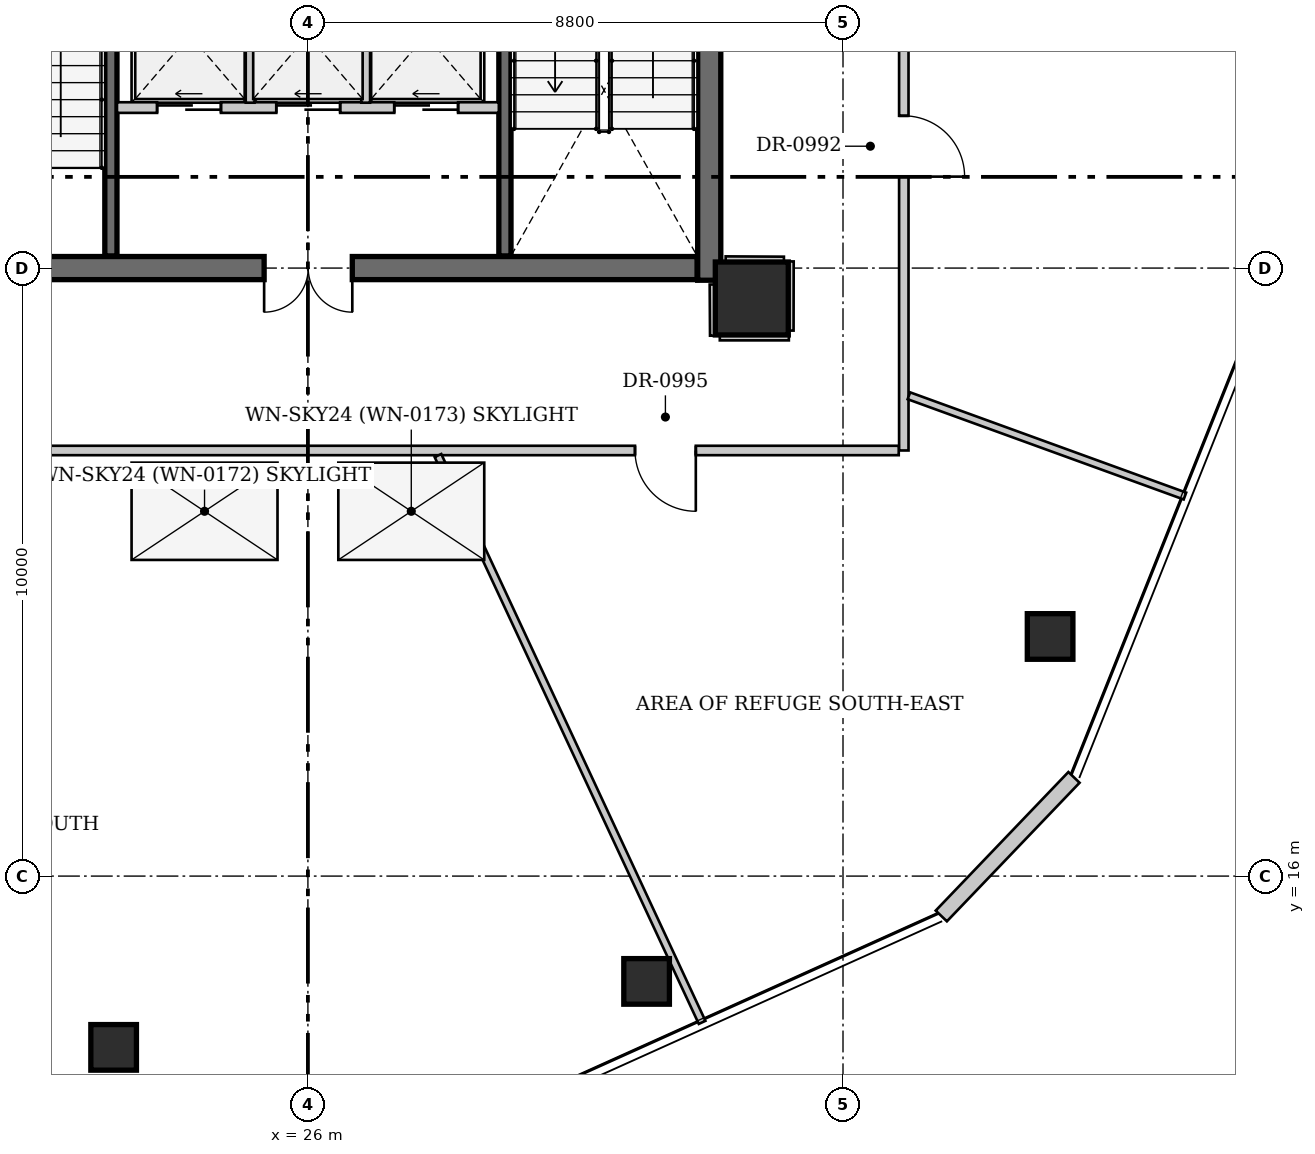
"""IFC4 building model, lengths in metres.
Left out: names, types, materials, properties, quantities, classifications, styles, units other than length and angle.
Written with IfcOpenShell. Run it as: python <this file> out.ifc"""

import sys

from ifc_helpers import new_model, si_unit, direction, frame, frame_2d, origin, origin_2d, place, context, subcontext, project, spatial, rectangle, hollow_rectangle, extrude, source, transform, mapped, element, fill, save


model = new_model("IFC4")
c1 = context("Model", 3, precision=1e-05, world=origin(), true_north=direction((0.0, 1.0)))
c2 = subcontext(c1, "Body", "Model", "MODEL_VIEW")
j1 = project(units=[si_unit("LENGTHUNIT", "METRE"), si_unit("PLANEANGLEUNIT", "RADIAN")], contexts=[c1])
p1 = place(None, origin())
s1 = spatial("IfcSite", under=j1, at=p1, CompositionType="ELEMENT")
p2 = place(p1, origin())
s2 = spatial("IfcBuilding", under=s1, at=p2, CompositionType="ELEMENT")
p3 = place(p2, frame((0.0, 0.0, 162.4)))
s3 = spatial("IfcBuildingStorey", under=s2, at=p3, CompositionType="ELEMENT", Elevation=162.4)
for number, where, z_axis, x_axis in (
    (1, (38.206, 19.941, 0.0), (0.0, 0.0, 1.0), (1.0, 0.0, 0.0)),
    (2, (31.57, 14.268, 0.0), (0.0, 0.0, 1.0), (1.0, 0.0, 0.0)),
    (3, (22.805, 13.183, 0.0), (0.0, 0.0, 1.0), (1.0, 0.0, 0.0)),
):
    element("IfcColumn", number, at=place(p3, frame(where, z_axis=z_axis, x_axis=x_axis)), inside=s3, PredefinedType="COLUMN", context=c2, shape_type="SweptSolid", body=[
        extrude(hollow_rectangle(XDim=0.75, YDim=0.75, WallThickness=0.04, at=origin_2d()), origin(), (0.0, 0.0, 1.0), 4.15),
    ])
p4 = place(p3, frame((33.3, 25.5, 0.0), z_axis=(0.0, 0.0, 1.0), x_axis=(1.0, 0.0, 0.0)))
e4 = element("IfcColumn", 4, at=p4, inside=s3, PredefinedType="COLUMN", context=c2, shape_type="SweptSolid", body=[
    extrude(rectangle(XDim=1.2, YDim=1.2, at=origin_2d()), origin(), (0.0, 0.0, 1.0), 4.15),
])
p5 = place(p3, frame((38.599, 17.623, 0.0), z_axis=(0.0, 0.0, 1.0), x_axis=(-0.691540575934, -0.722337616241, 0.0)))
e5 = element("IfcWall", 5, at=p5, inside=s3, PredefinedType="SOLIDWALL", context=c2, shape_type="SweptSolid", body=[
    extrude(rectangle(XDim=3.155, YDim=0.255, at=frame_2d((1.578, 0.0))), origin(), (0.0, 0.0, 1.0), 4.15),
])
p6 = place(p3, frame((32.6, 36.6, 0.0), z_axis=(0.0, 0.0, 1.0), x_axis=(0.0, -1.0, 0.0)))
e6 = element("IfcWall", 6, at=p6, inside=s3, PredefinedType="SHEAR", context=c2, shape_type="SweptSolid", body=[
    extrude(rectangle(XDim=10.8, YDim=0.38, at=frame_2d((5.4, 0.0))), origin(), (0.0, 0.0, 1.0), 4.6),
])
p7 = place(p6, frame((3.7, 0.0, 0.0)))
e7 = element("IfcOpeningElement", 7, at=p7, cuts=e6, PredefinedType="OPENING", context=c2, shape_type="SweptSolid", body=[
    extrude(rectangle(XDim=1.05, YDim=2.15, at=frame_2d((0.525, 1.075))), frame((0.0, 0.2, 0.0), z_axis=(0.0, -1.0, 0.0), x_axis=(1.0, 0.0, 0.0)), (0.0, 0.0, 1.0), 0.4),
])
p8 = place(p6, frame((2.05, 0.0, 0.0)))
e8 = element("IfcOpeningElement", 8, at=p8, cuts=e6, PredefinedType="OPENING", context=c2, shape_type="SweptSolid", body=[
    extrude(rectangle(XDim=0.9, YDim=2.1, at=frame_2d((0.45, 1.05))), frame((0.0, 0.2, 0.0), z_axis=(0.0, -1.0, 0.0), x_axis=(1.0, 0.0, 0.0)), (0.0, 0.0, 1.0), 0.4),
])
p9 = place(p3, frame((32.4, 26.0, 0.0), z_axis=(0.0, 0.0, 1.0), x_axis=(-1.0, 0.0, 0.0)))
e9 = element("IfcWall", 9, at=p9, inside=s3, PredefinedType="SHEAR", context=c2, shape_type="SweptSolid", body=[
    extrude(rectangle(XDim=12.8, YDim=0.38, at=frame_2d((6.4, 0.0))), origin(), (0.0, 0.0, 1.0), 4.6),
])
p10 = place(p9, frame((10.75, 0.0, 0.0)))
e10 = element("IfcOpeningElement", 10, at=p10, cuts=e9, PredefinedType="OPENING", context=c2, shape_type="SweptSolid", body=[
    extrude(rectangle(XDim=1.05, YDim=2.15, at=frame_2d((0.525, 1.075))), frame((0.0, 0.2, 0.0), z_axis=(0.0, -1.0, 0.0), x_axis=(1.0, 0.0, 0.0)), (0.0, 0.0, 1.0), 0.4),
])
p11 = place(p9, frame((5.67, 0.0, 0.0)))
e11 = element("IfcOpeningElement", 11, at=p11, cuts=e9, PredefinedType="OPENING", context=c2, shape_type="SweptSolid", body=[
    extrude(rectangle(XDim=1.45, YDim=2.2, at=frame_2d((0.725, 1.1))), frame((0.0, 0.2, 0.0), z_axis=(0.0, -1.0, 0.0), x_axis=(1.0, 0.0, 0.0)), (0.0, 0.0, 1.0), 0.4),
])
p12 = place(p3, frame((22.76, 26.2, 0.0), z_axis=(0.0, 0.0, 1.0), x_axis=(0.0, 1.0, 0.0)))
e12 = element("IfcWall", 12, at=p12, inside=s3, PredefinedType="SHEAR", context=c2, shape_type="SweptSolid", body=[
    extrude(rectangle(XDim=10.0, YDim=0.2, at=frame_2d((5.0, 0.0))), origin(), (0.0, 0.0, 1.0), 4.6),
])
p13 = place(p3, frame((29.24, 26.2, 0.0), z_axis=(0.0, 0.0, 1.0), x_axis=(0.0, 1.0, 0.0)))
e13 = element("IfcWall", 13, at=p13, inside=s3, PredefinedType="SHEAR", context=c2, shape_type="SweptSolid", body=[
    extrude(rectangle(XDim=10.0, YDim=0.2, at=frame_2d((5.0, 0.0))), origin(), (0.0, 0.0, 1.0), 4.6),
])
p14 = place(p13, frame((5.65, 0.0, 0.0)))
e14 = element("IfcOpeningElement", 14, at=p14, cuts=e13, PredefinedType="OPENING", context=c2, shape_type="SweptSolid", body=[
    extrude(rectangle(XDim=1.05, YDim=2.15, at=frame_2d((0.525, 1.075))), frame((0.0, 0.11, 0.0), z_axis=(0.0, -1.0, 0.0), x_axis=(1.0, 0.0, 0.0)), (0.0, 0.0, 1.0), 0.22),
])
p15 = place(p3, frame((22.86, 28.64, 0.0), z_axis=(0.0, 0.0, 1.0), x_axis=(1.0, 0.0, 0.0)))
e15 = element("IfcWall", 15, at=p15, inside=s3, PredefinedType="SOLIDWALL", context=c2, shape_type="SweptSolid", body=[
    extrude(rectangle(XDim=6.28, YDim=0.175, at=frame_2d((3.14, 0.0))), origin(), (0.0, 0.0, 1.0), 4.15),
])
p16 = place(p15, frame((0.66, 0.0, 0.0)))
e16 = element("IfcOpeningElement", 16, at=p16, cuts=e15, PredefinedType="OPENING", context=c2, shape_type="SweptSolid", body=[
    extrude(rectangle(XDim=1.05, YDim=2.15, at=frame_2d((0.525, 1.075))), frame((0.0, 0.098, 0.0), z_axis=(0.0, -1.0, 0.0), x_axis=(1.0, 0.0, 0.0)), (0.0, 0.0, 1.0), 0.195),
])
p17 = place(p15, frame((2.62, 0.0, 0.0)))
e17 = element("IfcOpeningElement", 17, at=p17, cuts=e15, PredefinedType="OPENING", context=c2, shape_type="SweptSolid", body=[
    extrude(rectangle(XDim=1.05, YDim=2.15, at=frame_2d((0.525, 1.075))), frame((0.0, 0.098, 0.0), z_axis=(0.0, -1.0, 0.0), x_axis=(1.0, 0.0, 0.0)), (0.0, 0.0, 1.0), 0.195),
])
p18 = place(p15, frame((4.56, 0.0, 0.0)))
e18 = element("IfcOpeningElement", 18, at=p18, cuts=e15, PredefinedType="OPENING", context=c2, shape_type="SweptSolid", body=[
    extrude(rectangle(XDim=1.05, YDim=2.15, at=frame_2d((0.525, 1.075))), frame((0.0, 0.098, 0.0), z_axis=(0.0, -1.0, 0.0), x_axis=(1.0, 0.0, 0.0)), (0.0, 0.0, 1.0), 0.195),
])
for number, where, z_axis, x_axis in (
    (19, (25.05, 28.72, 0.0), (0.0, 0.0, 1.0), (0.0, 1.0, 0.0)),
    (20, (26.95, 28.72, 0.0), (0.0, 0.0, 1.0), (0.0, 1.0, 0.0)),
):
    element("IfcWall", number, at=place(p3, frame(where, z_axis=z_axis, x_axis=x_axis)), inside=s3, PredefinedType="SOLIDWALL", context=c2, shape_type="SweptSolid", body=[
        extrude(rectangle(XDim=2.207, YDim=0.145, at=frame_2d((1.103, 0.0))), origin(), (0.0, 0.0, 1.0), 4.15),
    ])
p19 = place(p3, frame((35.8, 41.267, 0.0), z_axis=(0.0, 0.0, 1.0), x_axis=(0.0, -1.0, 0.0)))
e21 = element("IfcWall", 21, at=p19, inside=s3, PredefinedType="PARTITIONING", context=c2, shape_type="SweptSolid", body=[
    extrude(rectangle(XDim=18.267, YDim=0.155, at=frame_2d((9.133, 0.0))), origin(), (0.0, 0.0, 1.0), 4.15),
])
p20 = place(p19, frame((12.762, 0.0, 0.0)))
e22 = element("IfcOpeningElement", 22, at=p20, cuts=e21, PredefinedType="OPENING", context=c2, shape_type="SweptSolid", body=[
    extrude(rectangle(XDim=1.0, YDim=2.15, at=frame_2d((0.5, 1.075))), frame((0.0, 0.087, 0.0), z_axis=(0.0, -1.0, 0.0), x_axis=(1.0, 0.0, 0.0)), (0.0, 0.0, 1.0), 0.175),
])
p21 = place(p19, frame((4.126, 0.0, 0.0)))
e23 = element("IfcOpeningElement", 23, at=p21, cuts=e21, PredefinedType="OPENING", context=c2, shape_type="SweptSolid", body=[
    extrude(rectangle(XDim=1.0, YDim=2.15, at=frame_2d((0.5, 1.075))), frame((0.0, 0.087, 0.0), z_axis=(0.0, -1.0, 0.0), x_axis=(1.0, 0.0, 0.0)), (0.0, 0.0, 1.0), 0.175),
])
p22 = place(p3, frame((35.717, 23.0, 0.0), z_axis=(0.0, 0.0, 1.0), x_axis=(-1.0, 0.0, 0.0)))
e24 = element("IfcWall", 24, at=p22, inside=s3, PredefinedType="PARTITIONING", context=c2, shape_type="SweptSolid", body=[
    extrude(rectangle(XDim=20.517, YDim=0.155, at=frame_2d((10.258, 0.0))), origin(), (0.0, 0.0, 1.0), 4.15),
])
p23 = place(p22, frame((16.507, 0.0, 0.0)))
e25 = element("IfcOpeningElement", 25, at=p23, cuts=e24, PredefinedType="OPENING", context=c2, shape_type="SweptSolid", body=[
    extrude(rectangle(XDim=1.0, YDim=2.15, at=frame_2d((0.5, 1.075))), frame((0.0, 0.087, 0.0), z_axis=(0.0, -1.0, 0.0), x_axis=(1.0, 0.0, 0.0)), (0.0, 0.0, 1.0), 0.175),
])
p24 = place(p22, frame((3.337, 0.0, 0.0)))
e26 = element("IfcOpeningElement", 26, at=p24, cuts=e24, PredefinedType="OPENING", context=c2, shape_type="SweptSolid", body=[
    extrude(rectangle(XDim=1.0, YDim=2.15, at=frame_2d((0.5, 1.075))), frame((0.0, 0.087, 0.0), z_axis=(0.0, -1.0, 0.0), x_axis=(1.0, 0.0, 0.0)), (0.0, 0.0, 1.0), 0.175),
])
p25 = place(p3, frame((32.685, 25.73, 0.0), z_axis=(0.0, 0.0, 1.0), x_axis=(0.006382231486, -0.999979633353, 0.0)))
e27 = element("IfcWall", 27, at=p25, inside=s3, PredefinedType="PARTITIONING", context=c2, shape_type="SweptSolid", body=[
    extrude(rectangle(XDim=0.842, YDim=0.155, at=frame_2d((0.421, 0.0))), origin(), (0.0, 0.0, 1.0), 2.725),
])
p26 = place(p3, frame((32.774, 24.888, 0.0), z_axis=(0.0, 0.0, 1.0), x_axis=(1.0, 0.0, 0.0)))
e28 = element("IfcWall", 28, at=p26, inside=s3, PredefinedType="PARTITIONING", context=c2, shape_type="SweptSolid", body=[
    extrude(rectangle(XDim=1.135, YDim=0.155, at=frame_2d((0.568, 0.0))), origin(), (0.0, 0.0, 1.0), 2.725),
])
p27 = place(p3, frame((33.91, 24.972, 0.0), z_axis=(0.0, 0.0, 1.0), x_axis=(0.001716735668, 0.999998526408, 0.0)))
e29 = element("IfcWall", 29, at=p27, inside=s3, PredefinedType="PARTITIONING", context=c2, shape_type="SweptSolid", body=[
    extrude(rectangle(XDim=1.138, YDim=0.155, at=frame_2d((0.569, 0.0))), origin(), (0.0, 0.0, 1.0), 2.725),
])
p28 = place(p3, frame((33.828, 26.11, 0.0), z_axis=(0.0, 0.0, 1.0), x_axis=(-0.999987011364, 0.005096773758, 0.0)))
e30 = element("IfcWall", 30, at=p28, inside=s3, PredefinedType="PARTITIONING", context=c2, shape_type="SweptSolid", body=[
    extrude(rectangle(XDim=0.958, YDim=0.155, at=frame_2d((0.479, 0.0))), origin(), (0.0, 0.0, 1.0), 2.725),
])
p29 = place(p3, frame((28.139, 22.917, 0.0), z_axis=(0.0, 0.0, 1.0), x_axis=(0.42234608786, -0.906434654054, 0.0)))
e31 = element("IfcWall", 31, at=p29, inside=s3, PredefinedType="PARTITIONING", context=c2, shape_type="SweptSolid", body=[
    extrude(rectangle(XDim=10.285, YDim=0.12, at=frame_2d((5.143, 0.0))), origin(), (0.0, 0.0, 1.0), 4.15),
])
p30 = place(p3, frame((35.884, 23.9, 0.0), z_axis=(0.0, 0.0, 1.0), x_axis=(0.939920279449, -0.341394007389, 0.0)))
e32 = element("IfcWall", 32, at=p30, inside=s3, PredefinedType="PARTITIONING", context=c2, shape_type="SweptSolid", body=[
    extrude(rectangle(XDim=4.83, YDim=0.12, at=frame_2d((2.415, 0.0))), origin(), (0.0, 0.0, 1.0), 4.15),
])
p31 = place(p3, frame((0.0, 0.0, -0.35)))
p32 = place(p31, frame((24.3, 22.0, 0.3)))
e33 = element("IfcWindow", 33, at=p32, inside=s3, PartitioningType="SINGLE_PANEL", PredefinedType="SKYLIGHT", context=c2, shape_type="SweptSolid", body=[
    extrude(rectangle(XDim=2.4, YDim=1.6, at=origin_2d()), origin(), (0.0, 0.0, 1.0), 0.05),
])
p33 = place(p31, frame((27.7, 22.0, 0.3)))
e34 = element("IfcWindow", 34, at=p33, inside=s3, PartitioningType="SINGLE_PANEL", PredefinedType="SKYLIGHT", context=c2, shape_type="SweptSolid", body=[
    extrude(rectangle(XDim=2.4, YDim=1.6, at=origin_2d()), origin(), (0.0, 0.0, 1.0), 0.05),
])
m1 = source(origin(), c2, "Body", "SweptSolid", [
    extrude(rectangle(XDim=1.45, YDim=2.2, at=frame_2d((0.725, 1.1))), frame((0.0, 0.025, 0.0), z_axis=(0.0, -1.0, 0.0), x_axis=(1.0, 0.0, 0.0)), (0.0, 0.0, 1.0), 0.05),
])
p34 = place(p11, origin())
e35 = element("IfcDoor", 35, at=p34, inside=s3, OperationType="DOUBLE_DOOR_SINGLE_SWING", PredefinedType="DOOR", context=c2, shape_type="MappedRepresentation", body=[
    mapped(m1, transform((0.0, 0.0, 0.0), x_axis=(1.0, 0.0, 0.0), y_axis=(0.0, 1.0, 0.0), z_axis=(0.0, 0.0, 1.0), scale=1.0)),
])
fill(e11, e35)
m2 = source(origin(), c2, "Body", "SweptSolid", [
    extrude(rectangle(XDim=1.05, YDim=2.15, at=frame_2d((0.525, 1.075))), frame((0.0, 0.025, 0.0), z_axis=(0.0, -1.0, 0.0), x_axis=(1.0, 0.0, 0.0)), (0.0, 0.0, 1.0), 0.05),
])
p35 = place(p16, origin())
e36 = element("IfcDoor", 36, at=p35, inside=s3, OperationType="SLIDING_TO_LEFT", PredefinedType="DOOR", context=c2, shape_type="MappedRepresentation", body=[
    mapped(m2, transform((0.0, 0.0, 0.0), x_axis=(1.0, 0.0, 0.0), y_axis=(0.0, 1.0, 0.0), z_axis=(0.0, 0.0, 1.0), scale=1.0)),
])
fill(e16, e36)
p36 = place(p17, origin())
e37 = element("IfcDoor", 37, at=p36, inside=s3, OperationType="SLIDING_TO_LEFT", PredefinedType="DOOR", context=c2, shape_type="MappedRepresentation", body=[
    mapped(m2, transform((0.0, 0.0, 0.0), x_axis=(1.0, 0.0, 0.0), y_axis=(0.0, 1.0, 0.0), z_axis=(0.0, 0.0, 1.0), scale=1.0)),
])
fill(e17, e37)
p37 = place(p18, origin())
e38 = element("IfcDoor", 38, at=p37, inside=s3, OperationType="SLIDING_TO_LEFT", PredefinedType="DOOR", context=c2, shape_type="MappedRepresentation", body=[
    mapped(m2, transform((0.0, 0.0, 0.0), x_axis=(1.0, 0.0, 0.0), y_axis=(0.0, 1.0, 0.0), z_axis=(0.0, 0.0, 1.0), scale=1.0)),
])
fill(e18, e38)
m3 = source(origin(), c2, "Body", "SweptSolid", [
    extrude(rectangle(XDim=1.0, YDim=2.15, at=frame_2d((0.5, 1.075))), frame((0.0, 0.025, 0.0), z_axis=(0.0, -1.0, 0.0), x_axis=(1.0, 0.0, 0.0)), (0.0, 0.0, 1.0), 0.05),
])
p38 = place(p20, origin())
e39 = element("IfcDoor", 39, at=p38, inside=s3, OperationType="SINGLE_SWING_RIGHT", PredefinedType="DOOR", context=c2, shape_type="MappedRepresentation", body=[
    mapped(m3, transform((0.0, 0.0, 0.0), x_axis=(1.0, 0.0, 0.0), y_axis=(0.0, 1.0, 0.0), z_axis=(0.0, 0.0, 1.0), scale=1.0)),
])
fill(e22, e39)
p39 = place(p24, origin())
e40 = element("IfcDoor", 40, at=p39, inside=s3, OperationType="SINGLE_SWING_LEFT", PredefinedType="DOOR", context=c2, shape_type="MappedRepresentation", body=[
    mapped(m3, transform((0.0, 0.0, 0.0), x_axis=(1.0, 0.0, 0.0), y_axis=(0.0, 1.0, 0.0), z_axis=(0.0, 0.0, 1.0), scale=1.0)),
])
fill(e26, e40)
save(model, sys.argv[1])
